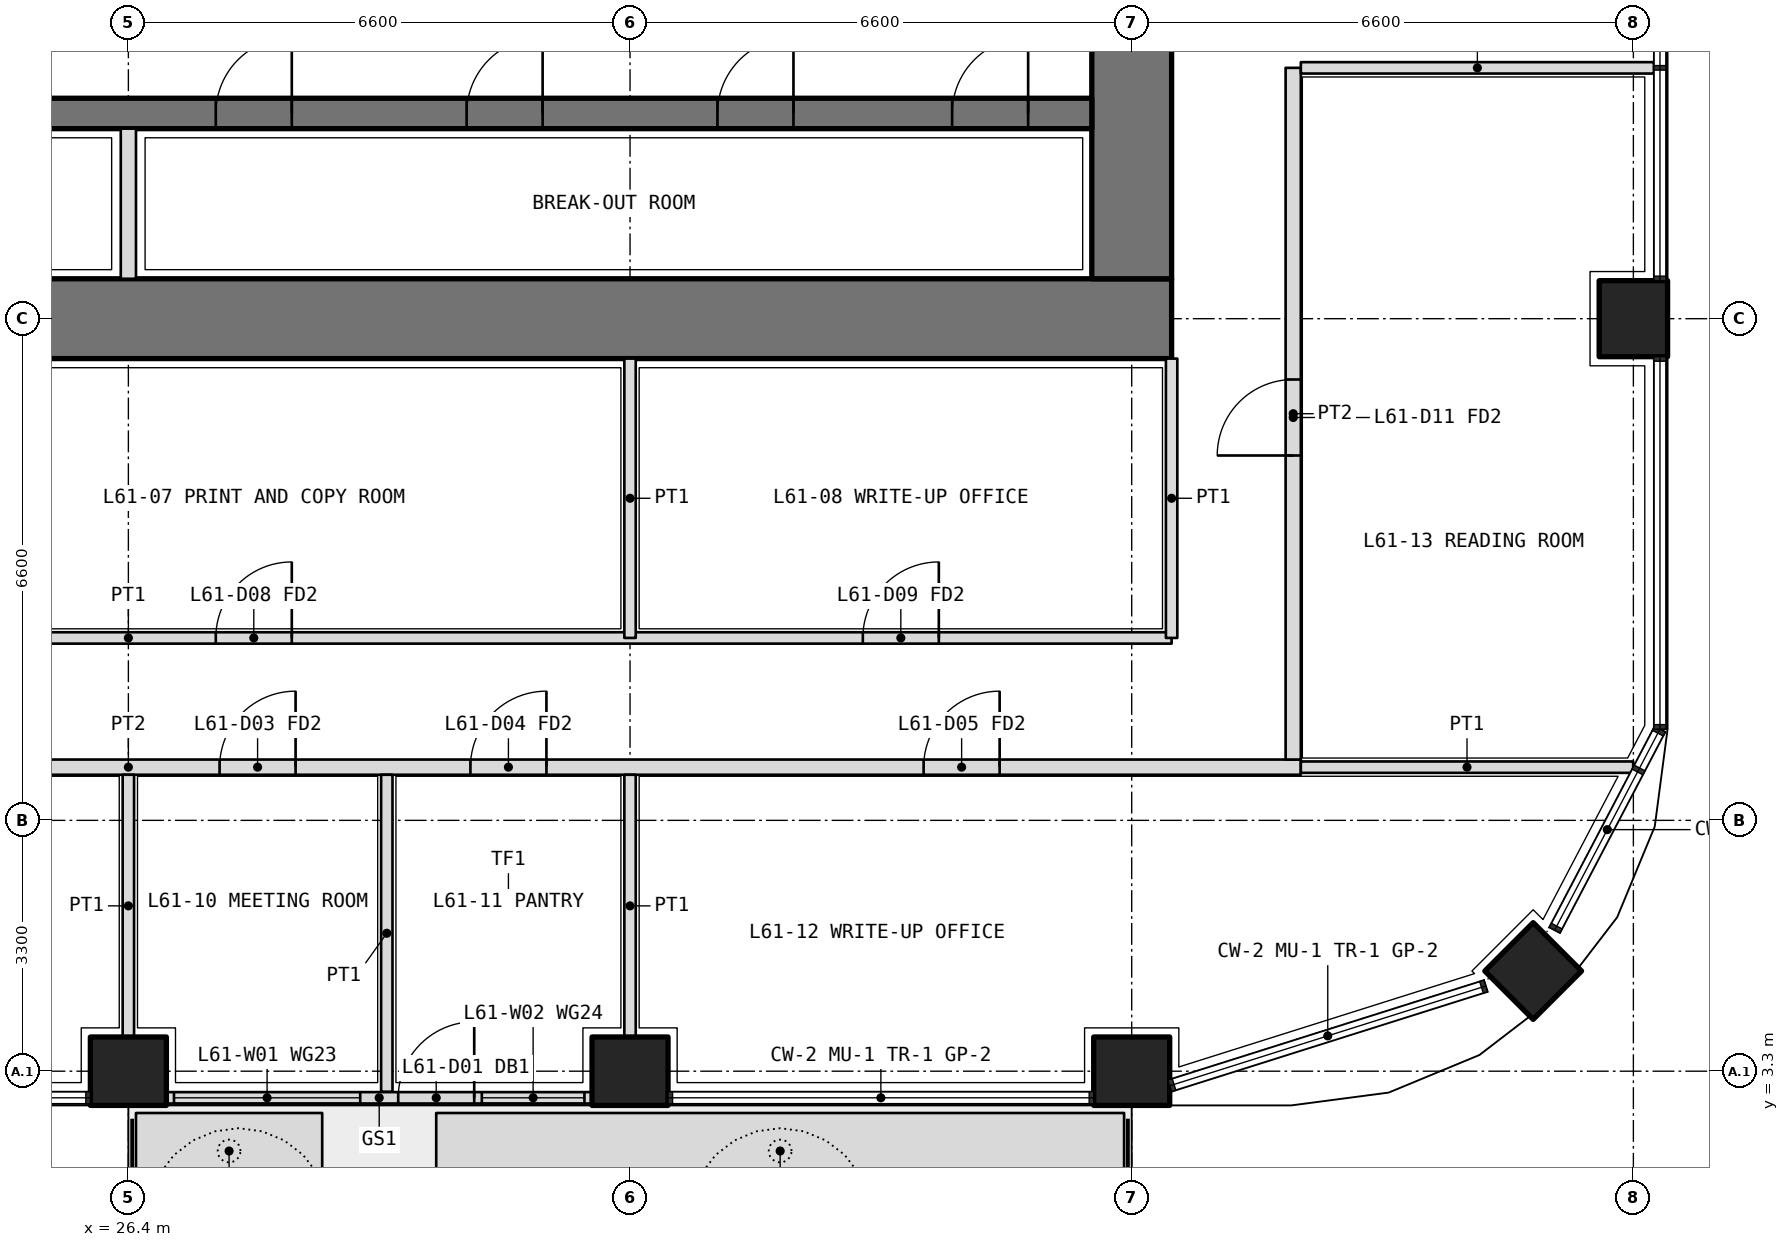
"""IFC4 building model, lengths in metres.
Left out: names, types, materials, properties, quantities, classifications, styles, units other than length and angle.
Written with IfcOpenShell. Run it as: python <this file> out.ifc"""

import sys

from ifc_helpers import new_model, si_unit, direction, frame, frame_2d, origin, origin_2d, place, context, subcontext, project, spatial, polyline, rectangle, outline, extrude, element, fill, save


model = new_model("IFC4")
c1 = context("Model", 3, precision=1e-05, world=origin(), true_north=direction((0.0, 1.0)))
c2 = subcontext(c1, "Body", "Model", "MODEL_VIEW")
j1 = project(units=[si_unit("LENGTHUNIT", "METRE"), si_unit("PLANEANGLEUNIT", "RADIAN")], contexts=[c1])
p1 = place(None, origin())
s1 = spatial("IfcSite", under=j1, at=p1, CompositionType="ELEMENT")
p2 = place(p1, origin())
s2 = spatial("IfcBuilding", under=s1, at=p2, CompositionType="ELEMENT")
p3 = place(p2, frame((0.0, 0.0, 267.0)))
s3 = spatial("IfcBuildingStorey", under=s2, at=p3, CompositionType="ELEMENT", Elevation=267.0)
p4 = place(p3, frame((44.882, 4.618, 0.0), z_axis=(0.0, 0.0, 1.0), x_axis=(0.707106781187, 0.707106781187, 0.0)))
e1 = element("IfcColumn", 1, at=p4, inside=s3, PredefinedType="COLUMN", context=c2, shape_type="SweptSolid", body=[
    extrude(rectangle(XDim=0.9, YDim=0.9, at=origin_2d()), origin(), (0.0, 0.0, 1.0), 4.2),
])
for number, where, z_axis, x_axis in (
    (2, (26.4, 3.3, 0.0), (0.0, 0.0, 1.0), (1.0, 0.0, 0.0)),
    (3, (33.0, 3.3, 0.0), (0.0, 0.0, 1.0), (1.0, 0.0, 0.0)),
    (4, (39.6, 3.3, 0.0), (0.0, 0.0, 1.0), (1.0, 0.0, 0.0)),
    (5, (46.2, 13.2, 0.0), (0.0, 0.0, 1.0), (0.0, 1.0, 0.0)),
):
    element("IfcColumn", number, at=place(p3, frame(where, z_axis=z_axis, x_axis=x_axis)), inside=s3, PredefinedType="COLUMN", context=c2, shape_type="SweptSolid", body=[
        extrude(rectangle(XDim=1.0, YDim=0.9, at=origin_2d()), origin(), (0.0, 0.0, 1.0), 4.2),
    ])
p5 = place(p3, origin())
e6 = element("IfcWall", 6, at=p5, inside=s3, PredefinedType="USERDEFINED", context=c2, shape_type="SweptSolid", body=[
    extrude(outline(polyline([(26.5, 1.75), (28.95, 1.75), (28.95, 2.75), (26.5, 2.75), (26.5, 1.75)]), holes=[polyline([(26.65, 1.9), (28.8, 1.9), (28.8, 2.6), (26.65, 2.6), (26.65, 1.9)])]), origin(), (0.0, 0.0, 1.0), 1.05),
])
p6 = place(p3, origin())
e7 = element("IfcWall", 7, at=p6, inside=s3, PredefinedType="USERDEFINED", context=c2, shape_type="SweptSolid", body=[
    extrude(outline(polyline([(30.45, 1.75), (39.5, 1.75), (39.5, 2.75), (30.45, 2.75), (30.45, 1.75)]), holes=[polyline([(30.6, 1.9), (39.35, 1.9), (39.35, 2.6), (30.6, 2.6), (30.6, 1.9)])]), origin(), (0.0, 0.0, 1.0), 1.05),
])
p7 = place(p3, frame((26.9, 2.95, 0.0), z_axis=(0.0, 0.0, 1.0), x_axis=(1.0, 0.0, 0.0)))
e8 = element("IfcWall", 8, at=p7, inside=s3, PredefinedType="SOLIDWALL", context=c2, shape_type="SweptSolid", body=[
    extrude(rectangle(XDim=5.6, YDim=0.15, at=frame_2d((2.8, 0.0))), origin(), (0.0, 0.0, 1.0), 2.7),
])
p8 = place(p7, frame((3.05, 0.0, 0.0)))
e9 = element("IfcOpeningElement", 9, at=p8, cuts=e8, PredefinedType="OPENING", context=c2, shape_type="SweptSolid", body=[
    extrude(rectangle(XDim=1.0, YDim=2.4, at=frame_2d((0.5, 1.2))), frame((0.0, 0.085, 0.0), z_axis=(0.0, -1.0, 0.0), x_axis=(1.0, 0.0, 0.0)), (0.0, 0.0, 1.0), 0.17),
])
p9 = place(p7, frame((0.1, 0.0, 0.1)))
e10 = element("IfcOpeningElement", 10, at=p9, cuts=e8, PredefinedType="OPENING", context=c2, shape_type="SweptSolid", body=[
    extrude(rectangle(XDim=2.45, YDim=2.3, at=frame_2d((1.225, 1.15))), frame((0.0, 0.085, 0.0), z_axis=(0.0, -1.0, 0.0), x_axis=(1.0, 0.0, 0.0)), (0.0, 0.0, 1.0), 0.17),
])
p10 = place(p7, frame((4.15, 0.0, 0.1)))
e11 = element("IfcOpeningElement", 11, at=p10, cuts=e8, PredefinedType="OPENING", context=c2, shape_type="SweptSolid", body=[
    extrude(rectangle(XDim=1.35, YDim=2.3, at=frame_2d((0.675, 1.15))), frame((0.0, 0.085, 0.0), z_axis=(0.0, -1.0, 0.0), x_axis=(1.0, 0.0, 0.0)), (0.0, 0.0, 1.0), 0.17),
])
p11 = place(p3, frame((12.675, 13.2, 0.0), z_axis=(0.0, 0.0, 1.0), x_axis=(1.0, 0.0, 0.0)))
e12 = element("IfcWall", 12, at=p11, inside=s3, PredefinedType="SHEAR", context=c2, shape_type="SweptSolid", body=[
    extrude(rectangle(XDim=27.45, YDim=1.05, at=frame_2d((13.725, 0.0))), origin(), (0.0, 0.0, 1.0), 4.2),
])
p12 = place(p3, frame((39.6, 13.725, 0.0), z_axis=(0.0, 0.0, 1.0), x_axis=(0.0, 1.0, 0.0)))
e13 = element("IfcWall", 13, at=p12, inside=s3, PredefinedType="SHEAR", context=c2, shape_type="SweptSolid", body=[
    extrude(rectangle(XDim=18.75, YDim=1.05, at=frame_2d((9.375, 0.0))), origin(), (0.0, 0.0, 1.0), 4.2),
])
p13 = place(p12, frame((3.025, 0.0, 0.0)))
e14 = element("IfcOpeningElement", 14, at=p13, cuts=e13, PredefinedType="OPENING", context=c2, shape_type="SweptSolid", body=[
    extrude(rectangle(XDim=1.6, YDim=2.1, at=frame_2d((0.8, 1.05))), frame((0.0, 0.535, 0.0), z_axis=(0.0, -1.0, 0.0), x_axis=(1.0, 0.0, 0.0)), (0.0, 0.0, 1.0), 1.07),
])
p14 = place(p12, frame((13.825, 0.0, 0.0)))
e15 = element("IfcOpeningElement", 15, at=p14, cuts=e13, PredefinedType="OPENING", context=c2, shape_type="SweptSolid", body=[
    extrude(rectangle(XDim=1.6, YDim=2.1, at=frame_2d((0.8, 1.05))), frame((0.0, 0.535, 0.0), z_axis=(0.0, -1.0, 0.0), x_axis=(1.0, 0.0, 0.0)), (0.0, 0.0, 1.0), 1.07),
])
p15 = place(p3, frame((13.725, 15.9, 0.0), z_axis=(0.0, 0.0, 1.0), x_axis=(1.0, 0.0, 0.0)))
e16 = element("IfcWall", 16, at=p15, inside=s3, PredefinedType="SHEAR", context=c2, shape_type="SweptSolid", body=[
    extrude(rectangle(XDim=25.35, YDim=0.4, at=frame_2d((12.675, 0.0))), origin(), (0.0, 0.0, 1.0), 4.2),
])
p16 = place(p15, frame((0.837, 0.0, 0.0)))
e17 = element("IfcOpeningElement", 17, at=p16, cuts=e16, PredefinedType="OPENING", context=c2, shape_type="SweptSolid", body=[
    extrude(rectangle(XDim=1.0, YDim=2.1, at=frame_2d((0.5, 1.05))), frame((0.0, 0.21, 0.0), z_axis=(0.0, -1.0, 0.0), x_axis=(1.0, 0.0, 0.0)), (0.0, 0.0, 1.0), 0.42),
])
p17 = place(p15, frame((3.925, 0.0, 0.0)))
e18 = element("IfcOpeningElement", 18, at=p17, cuts=e16, PredefinedType="OPENING", context=c2, shape_type="SweptSolid", body=[
    extrude(rectangle(XDim=1.0, YDim=2.1, at=frame_2d((0.5, 1.05))), frame((0.0, 0.21, 0.0), z_axis=(0.0, -1.0, 0.0), x_axis=(1.0, 0.0, 0.0)), (0.0, 0.0, 1.0), 0.42),
])
p18 = place(p15, frame((7.225, 0.0, 0.0)))
e19 = element("IfcOpeningElement", 19, at=p18, cuts=e16, PredefinedType="OPENING", context=c2, shape_type="SweptSolid", body=[
    extrude(rectangle(XDim=1.0, YDim=2.1, at=frame_2d((0.5, 1.05))), frame((0.0, 0.21, 0.0), z_axis=(0.0, -1.0, 0.0), x_axis=(1.0, 0.0, 0.0)), (0.0, 0.0, 1.0), 0.42),
])
p19 = place(p15, frame((10.525, 0.0, 0.0)))
e20 = element("IfcOpeningElement", 20, at=p19, cuts=e16, PredefinedType="OPENING", context=c2, shape_type="SweptSolid", body=[
    extrude(rectangle(XDim=1.0, YDim=2.1, at=frame_2d((0.5, 1.05))), frame((0.0, 0.21, 0.0), z_axis=(0.0, -1.0, 0.0), x_axis=(1.0, 0.0, 0.0)), (0.0, 0.0, 1.0), 0.42),
])
p20 = place(p15, frame((13.825, 0.0, 0.0)))
e21 = element("IfcOpeningElement", 21, at=p20, cuts=e16, PredefinedType="OPENING", context=c2, shape_type="SweptSolid", body=[
    extrude(rectangle(XDim=1.0, YDim=2.1, at=frame_2d((0.5, 1.05))), frame((0.0, 0.21, 0.0), z_axis=(0.0, -1.0, 0.0), x_axis=(1.0, 0.0, 0.0)), (0.0, 0.0, 1.0), 0.42),
])
p21 = place(p15, frame((17.125, 0.0, 0.0)))
e22 = element("IfcOpeningElement", 22, at=p21, cuts=e16, PredefinedType="OPENING", context=c2, shape_type="SweptSolid", body=[
    extrude(rectangle(XDim=1.0, YDim=2.1, at=frame_2d((0.5, 1.05))), frame((0.0, 0.21, 0.0), z_axis=(0.0, -1.0, 0.0), x_axis=(1.0, 0.0, 0.0)), (0.0, 0.0, 1.0), 0.42),
])
p22 = place(p15, frame((20.425, 0.0, 0.0)))
e23 = element("IfcOpeningElement", 23, at=p22, cuts=e16, PredefinedType="OPENING", context=c2, shape_type="SweptSolid", body=[
    extrude(rectangle(XDim=1.0, YDim=2.1, at=frame_2d((0.5, 1.05))), frame((0.0, 0.21, 0.0), z_axis=(0.0, -1.0, 0.0), x_axis=(1.0, 0.0, 0.0)), (0.0, 0.0, 1.0), 0.42),
])
p23 = place(p15, frame((23.512, 0.0, 0.0)))
e24 = element("IfcOpeningElement", 24, at=p23, cuts=e16, PredefinedType="OPENING", context=c2, shape_type="SweptSolid", body=[
    extrude(rectangle(XDim=1.0, YDim=2.1, at=frame_2d((0.5, 1.05))), frame((0.0, 0.21, 0.0), z_axis=(0.0, -1.0, 0.0), x_axis=(1.0, 0.0, 0.0)), (0.0, 0.0, 1.0), 0.42),
])
p24 = place(p3, frame((26.4, 13.725, 0.0), z_axis=(0.0, 0.0, 1.0), x_axis=(0.0, 1.0, 0.0)))
e25 = element("IfcWall", 25, at=p24, inside=s3, PredefinedType="PARTITIONING", context=c2, shape_type="SweptSolid", body=[
    extrude(rectangle(XDim=1.975, YDim=0.2, at=frame_2d((0.987, 0.0))), origin(), (0.0, 0.0, 1.0), 4.2),
])
p25 = place(p3, frame((12.675, 9.0, 0.0), z_axis=(0.0, 0.0, 1.0), x_axis=(1.0, 0.0, 0.0)))
e26 = element("IfcWall", 26, at=p25, inside=s3, PredefinedType="PARTITIONING", context=c2, shape_type="SweptSolid", body=[
    extrude(rectangle(XDim=27.45, YDim=0.15, at=frame_2d((13.725, 0.0))), origin(), (0.0, 0.0, 1.0), 3.0),
])
p26 = place(p25, frame((1.413, 0.0, 0.0)))
e27 = element("IfcOpeningElement", 27, at=p26, cuts=e26, PredefinedType="OPENING", context=c2, shape_type="SweptSolid", body=[
    extrude(rectangle(XDim=1.0, YDim=2.1, at=frame_2d((0.5, 1.05))), frame((0.0, 0.085, 0.0), z_axis=(0.0, -1.0, 0.0), x_axis=(1.0, 0.0, 0.0)), (0.0, 0.0, 1.0), 0.17),
])
p27 = place(p25, frame((6.625, 0.0, 0.0)))
e28 = element("IfcOpeningElement", 28, at=p27, cuts=e26, PredefinedType="OPENING", context=c2, shape_type="SweptSolid", body=[
    extrude(rectangle(XDim=1.0, YDim=2.1, at=frame_2d((0.5, 1.05))), frame((0.0, 0.085, 0.0), z_axis=(0.0, -1.0, 0.0), x_axis=(1.0, 0.0, 0.0)), (0.0, 0.0, 1.0), 0.17),
])
p28 = place(p25, frame((14.875, 0.0, 0.0)))
e29 = element("IfcOpeningElement", 29, at=p28, cuts=e26, PredefinedType="OPENING", context=c2, shape_type="SweptSolid", body=[
    extrude(rectangle(XDim=1.0, YDim=2.1, at=frame_2d((0.5, 1.05))), frame((0.0, 0.085, 0.0), z_axis=(0.0, -1.0, 0.0), x_axis=(1.0, 0.0, 0.0)), (0.0, 0.0, 1.0), 0.17),
])
p29 = place(p25, frame((23.387, 0.0, 0.0)))
e30 = element("IfcOpeningElement", 30, at=p29, cuts=e26, PredefinedType="OPENING", context=c2, shape_type="SweptSolid", body=[
    extrude(rectangle(XDim=1.0, YDim=2.1, at=frame_2d((0.5, 1.05))), frame((0.0, 0.085, 0.0), z_axis=(0.0, -1.0, 0.0), x_axis=(1.0, 0.0, 0.0)), (0.0, 0.0, 1.0), 0.17),
])
for number, where, z_axis, x_axis in (
    (31, (40.125, 12.675, 0.0), (0.0, 0.0, 1.0), (0.0, -1.0, 0.0)),
    (32, (33.0, 12.675, 0.0), (0.0, 0.0, 1.0), (0.0, -1.0, 0.0)),
):
    element("IfcWall", number, at=place(p3, frame(where, z_axis=z_axis, x_axis=x_axis)), inside=s3, PredefinedType="PARTITIONING", context=c2, shape_type="SweptSolid", body=[
        extrude(rectangle(XDim=3.675, YDim=0.15, at=frame_2d((1.837, 0.0))), origin(), (0.0, 0.0, 1.0), 3.0),
    ])
p30 = place(p3, frame((10.975, 7.3, 0.0), z_axis=(0.0, 0.0, 1.0), x_axis=(1.0, 0.0, 0.0)))
e33 = element("IfcWall", 33, at=p30, inside=s3, PredefinedType="PARTITIONING", context=c2, shape_type="SweptSolid", body=[
    extrude(rectangle(XDim=30.85, YDim=0.2, at=frame_2d((15.425, 0.0))), origin(), (0.0, 0.0, 1.0), 3.0),
])
p31 = place(p30, frame((7.262, 0.0, 0.0)))
e34 = element("IfcOpeningElement", 34, at=p31, cuts=e33, PredefinedType="OPENING", context=c2, shape_type="SweptSolid", body=[
    extrude(rectangle(XDim=1.0, YDim=2.1, at=frame_2d((0.5, 1.05))), frame((0.0, 0.11, 0.0), z_axis=(0.0, -1.0, 0.0), x_axis=(1.0, 0.0, 0.0)), (0.0, 0.0, 1.0), 0.22),
])
p32 = place(p30, frame((16.625, 0.0, 0.0)))
e35 = element("IfcOpeningElement", 35, at=p32, cuts=e33, PredefinedType="OPENING", context=c2, shape_type="SweptSolid", body=[
    extrude(rectangle(XDim=1.0, YDim=2.1, at=frame_2d((0.5, 1.05))), frame((0.0, 0.11, 0.0), z_axis=(0.0, -1.0, 0.0), x_axis=(1.0, 0.0, 0.0)), (0.0, 0.0, 1.0), 0.22),
])
p33 = place(p30, frame((19.925, 0.0, 0.0)))
e36 = element("IfcOpeningElement", 36, at=p33, cuts=e33, PredefinedType="OPENING", context=c2, shape_type="SweptSolid", body=[
    extrude(rectangle(XDim=1.0, YDim=2.1, at=frame_2d((0.5, 1.05))), frame((0.0, 0.11, 0.0), z_axis=(0.0, -1.0, 0.0), x_axis=(1.0, 0.0, 0.0)), (0.0, 0.0, 1.0), 0.22),
])
p34 = place(p30, frame((25.887, 0.0, 0.0)))
e37 = element("IfcOpeningElement", 37, at=p34, cuts=e33, PredefinedType="OPENING", context=c2, shape_type="SweptSolid", body=[
    extrude(rectangle(XDim=1.0, YDim=2.1, at=frame_2d((0.5, 1.05))), frame((0.0, 0.11, 0.0), z_axis=(0.0, -1.0, 0.0), x_axis=(1.0, 0.0, 0.0)), (0.0, 0.0, 1.0), 0.22),
])
p35 = place(p3, frame((41.725, 7.4, 0.0), z_axis=(0.0, 0.0, 1.0), x_axis=(0.0, 1.0, 0.0)))
e38 = element("IfcWall", 38, at=p35, inside=s3, PredefinedType="PARTITIONING", context=c2, shape_type="SweptSolid", body=[
    extrude(rectangle(XDim=9.1, YDim=0.2, at=frame_2d((4.55, 0.0))), origin(), (0.0, 0.0, 1.0), 3.0),
])
p36 = place(p35, frame((4.0, 0.0, 0.0)))
e39 = element("IfcOpeningElement", 39, at=p36, cuts=e38, PredefinedType="OPENING", context=c2, shape_type="SweptSolid", body=[
    extrude(rectangle(XDim=1.0, YDim=2.1, at=frame_2d((0.5, 1.05))), frame((0.0, 0.11, 0.0), z_axis=(0.0, -1.0, 0.0), x_axis=(1.0, 0.0, 0.0)), (0.0, 0.0, 1.0), 0.22),
])
p37 = place(p3, frame((46.198, 7.3, 0.0), z_axis=(0.0, 0.0, 1.0), x_axis=(-1.0, 0.0, 0.0)))
e40 = element("IfcWall", 40, at=p37, inside=s3, PredefinedType="PARTITIONING", context=c2, shape_type="SweptSolid", body=[
    extrude(rectangle(XDim=4.373, YDim=0.15, at=frame_2d((2.186, 0.0))), origin(), (0.0, 0.0, 1.0), 2.7),
])
p38 = place(p3, frame((29.8, 3.03, 0.0), z_axis=(0.0, 0.0, 1.0), x_axis=(0.0, 1.0, 0.0)))
e41 = element("IfcWall", 41, at=p38, inside=s3, PredefinedType="PARTITIONING", context=c2, shape_type="SweptSolid", body=[
    extrude(rectangle(XDim=4.17, YDim=0.15, at=frame_2d((2.085, 0.0))), origin(), (0.0, 0.0, 1.0), 2.7),
])
for number, where, z_axis, x_axis in (
    (42, (33.0, 3.75, 0.0), (0.0, 0.0, 1.0), (0.0, 1.0, 0.0)),
    (43, (26.4, 3.75, 0.0), (0.0, 0.0, 1.0), (0.0, 1.0, 0.0)),
):
    element("IfcWall", number, at=place(p3, frame(where, z_axis=z_axis, x_axis=x_axis)), inside=s3, PredefinedType="PARTITIONING", context=c2, shape_type="SweptSolid", body=[
        extrude(rectangle(XDim=3.45, YDim=0.15, at=frame_2d((1.725, 0.0))), origin(), (0.0, 0.0, 1.0), 3.0),
    ])
p39 = place(p3, frame((46.47, 16.5, 0.0), z_axis=(0.0, 0.0, 1.0), x_axis=(-1.0, 0.0, 0.0)))
e44 = element("IfcWall", 44, at=p39, inside=s3, PredefinedType="PARTITIONING", context=c2, shape_type="SweptSolid", body=[
    extrude(rectangle(XDim=4.645, YDim=0.15, at=frame_2d((2.323, 0.0))), origin(), (0.0, 0.0, 1.0), 2.7),
])
p40 = place(p8, origin())
e45 = element("IfcDoor", 45, at=p40, inside=s3, OperationType="SINGLE_SWING_RIGHT", PredefinedType="DOOR", context=c2, shape_type="SweptSolid", body=[
    extrude(rectangle(XDim=1.0, YDim=2.4, at=frame_2d((0.5, 1.2))), frame((0.0, 0.025, 0.0), z_axis=(0.0, -1.0, 0.0), x_axis=(1.0, 0.0, 0.0)), (0.0, 0.0, 1.0), 0.05),
])
fill(e9, e45)
p41 = place(p9, origin())
e46 = element("IfcWindow", 46, at=p41, inside=s3, PartitioningType="SINGLE_PANEL", PredefinedType="WINDOW", context=c2, shape_type="SweptSolid", body=[
    extrude(rectangle(XDim=2.45, YDim=2.3, at=frame_2d((1.225, 1.15))), frame((0.0, 0.03, 0.0), z_axis=(0.0, -1.0, 0.0), x_axis=(1.0, 0.0, 0.0)), (0.0, 0.0, 1.0), 0.06),
])
fill(e10, e46)
p42 = place(p10, origin())
e47 = element("IfcWindow", 47, at=p42, inside=s3, PartitioningType="SINGLE_PANEL", PredefinedType="WINDOW", context=c2, shape_type="SweptSolid", body=[
    extrude(rectangle(XDim=1.35, YDim=2.3, at=frame_2d((0.675, 1.15))), frame((0.0, 0.03, 0.0), z_axis=(0.0, -1.0, 0.0), x_axis=(1.0, 0.0, 0.0)), (0.0, 0.0, 1.0), 0.06),
])
fill(e11, e47)
p43 = place(p28, origin())
e48 = element("IfcDoor", 48, at=p43, inside=s3, OperationType="SINGLE_SWING_RIGHT", PredefinedType="DOOR", context=c2, shape_type="SweptSolid", body=[
    extrude(rectangle(XDim=1.0, YDim=2.1, at=frame_2d((0.5, 1.05))), frame((0.0, 0.025, 0.0), z_axis=(0.0, -1.0, 0.0), x_axis=(1.0, 0.0, 0.0)), (0.0, 0.0, 1.0), 0.05),
])
fill(e29, e48)
p44 = place(p29, origin())
e49 = element("IfcDoor", 49, at=p44, inside=s3, OperationType="SINGLE_SWING_RIGHT", PredefinedType="DOOR", context=c2, shape_type="SweptSolid", body=[
    extrude(rectangle(XDim=1.0, YDim=2.1, at=frame_2d((0.5, 1.05))), frame((0.0, 0.025, 0.0), z_axis=(0.0, -1.0, 0.0), x_axis=(1.0, 0.0, 0.0)), (0.0, 0.0, 1.0), 0.05),
])
fill(e30, e49)
p45 = place(p32, origin())
e50 = element("IfcDoor", 50, at=p45, inside=s3, OperationType="SINGLE_SWING_RIGHT", PredefinedType="DOOR", context=c2, shape_type="SweptSolid", body=[
    extrude(rectangle(XDim=1.0, YDim=2.1, at=frame_2d((0.5, 1.05))), frame((0.0, 0.025, 0.0), z_axis=(0.0, -1.0, 0.0), x_axis=(1.0, 0.0, 0.0)), (0.0, 0.0, 1.0), 0.05),
])
fill(e35, e50)
p46 = place(p33, origin())
e51 = element("IfcDoor", 51, at=p46, inside=s3, OperationType="SINGLE_SWING_RIGHT", PredefinedType="DOOR", context=c2, shape_type="SweptSolid", body=[
    extrude(rectangle(XDim=1.0, YDim=2.1, at=frame_2d((0.5, 1.05))), frame((0.0, 0.025, 0.0), z_axis=(0.0, -1.0, 0.0), x_axis=(1.0, 0.0, 0.0)), (0.0, 0.0, 1.0), 0.05),
])
fill(e36, e51)
p47 = place(p34, origin())
e52 = element("IfcDoor", 52, at=p47, inside=s3, OperationType="SINGLE_SWING_RIGHT", PredefinedType="DOOR", context=c2, shape_type="SweptSolid", body=[
    extrude(rectangle(XDim=1.0, YDim=2.1, at=frame_2d((0.5, 1.05))), frame((0.0, 0.025, 0.0), z_axis=(0.0, -1.0, 0.0), x_axis=(1.0, 0.0, 0.0)), (0.0, 0.0, 1.0), 0.05),
])
fill(e37, e52)
p48 = place(p36, origin())
e53 = element("IfcDoor", 53, at=p48, inside=s3, OperationType="SINGLE_SWING_LEFT", PredefinedType="DOOR", context=c2, shape_type="SweptSolid", body=[
    extrude(rectangle(XDim=1.0, YDim=2.1, at=frame_2d((0.5, 1.05))), frame((0.0, 0.025, 0.0), z_axis=(0.0, -1.0, 0.0), x_axis=(1.0, 0.0, 0.0)), (0.0, 0.0, 1.0), 0.05),
])
fill(e39, e53)
p49 = place(p20, origin())
e54 = element("IfcDoor", 54, at=p49, inside=s3, OperationType="SINGLE_SWING_RIGHT", PredefinedType="DOOR", context=c2, shape_type="SweptSolid", body=[
    extrude(rectangle(XDim=1.0, YDim=2.1, at=frame_2d((0.5, 1.05))), frame((0.0, 0.025, 0.0), z_axis=(0.0, -1.0, 0.0), x_axis=(1.0, 0.0, 0.0)), (0.0, 0.0, 1.0), 0.05),
])
fill(e21, e54)
p50 = place(p21, origin())
e55 = element("IfcDoor", 55, at=p50, inside=s3, OperationType="SINGLE_SWING_RIGHT", PredefinedType="DOOR", context=c2, shape_type="SweptSolid", body=[
    extrude(rectangle(XDim=1.0, YDim=2.1, at=frame_2d((0.5, 1.05))), frame((0.0, 0.025, 0.0), z_axis=(0.0, -1.0, 0.0), x_axis=(1.0, 0.0, 0.0)), (0.0, 0.0, 1.0), 0.05),
])
fill(e22, e55)
p51 = place(p22, origin())
e56 = element("IfcDoor", 56, at=p51, inside=s3, OperationType="SINGLE_SWING_RIGHT", PredefinedType="DOOR", context=c2, shape_type="SweptSolid", body=[
    extrude(rectangle(XDim=1.0, YDim=2.1, at=frame_2d((0.5, 1.05))), frame((0.0, 0.025, 0.0), z_axis=(0.0, -1.0, 0.0), x_axis=(1.0, 0.0, 0.0)), (0.0, 0.0, 1.0), 0.05),
])
fill(e23, e56)
p52 = place(p23, origin())
e57 = element("IfcDoor", 57, at=p52, inside=s3, OperationType="SINGLE_SWING_RIGHT", PredefinedType="DOOR", context=c2, shape_type="SweptSolid", body=[
    extrude(rectangle(XDim=1.0, YDim=2.1, at=frame_2d((0.5, 1.05))), frame((0.0, 0.025, 0.0), z_axis=(0.0, -1.0, 0.0), x_axis=(1.0, 0.0, 0.0)), (0.0, 0.0, 1.0), 0.05),
])
fill(e24, e57)
save(model, sys.argv[1])
